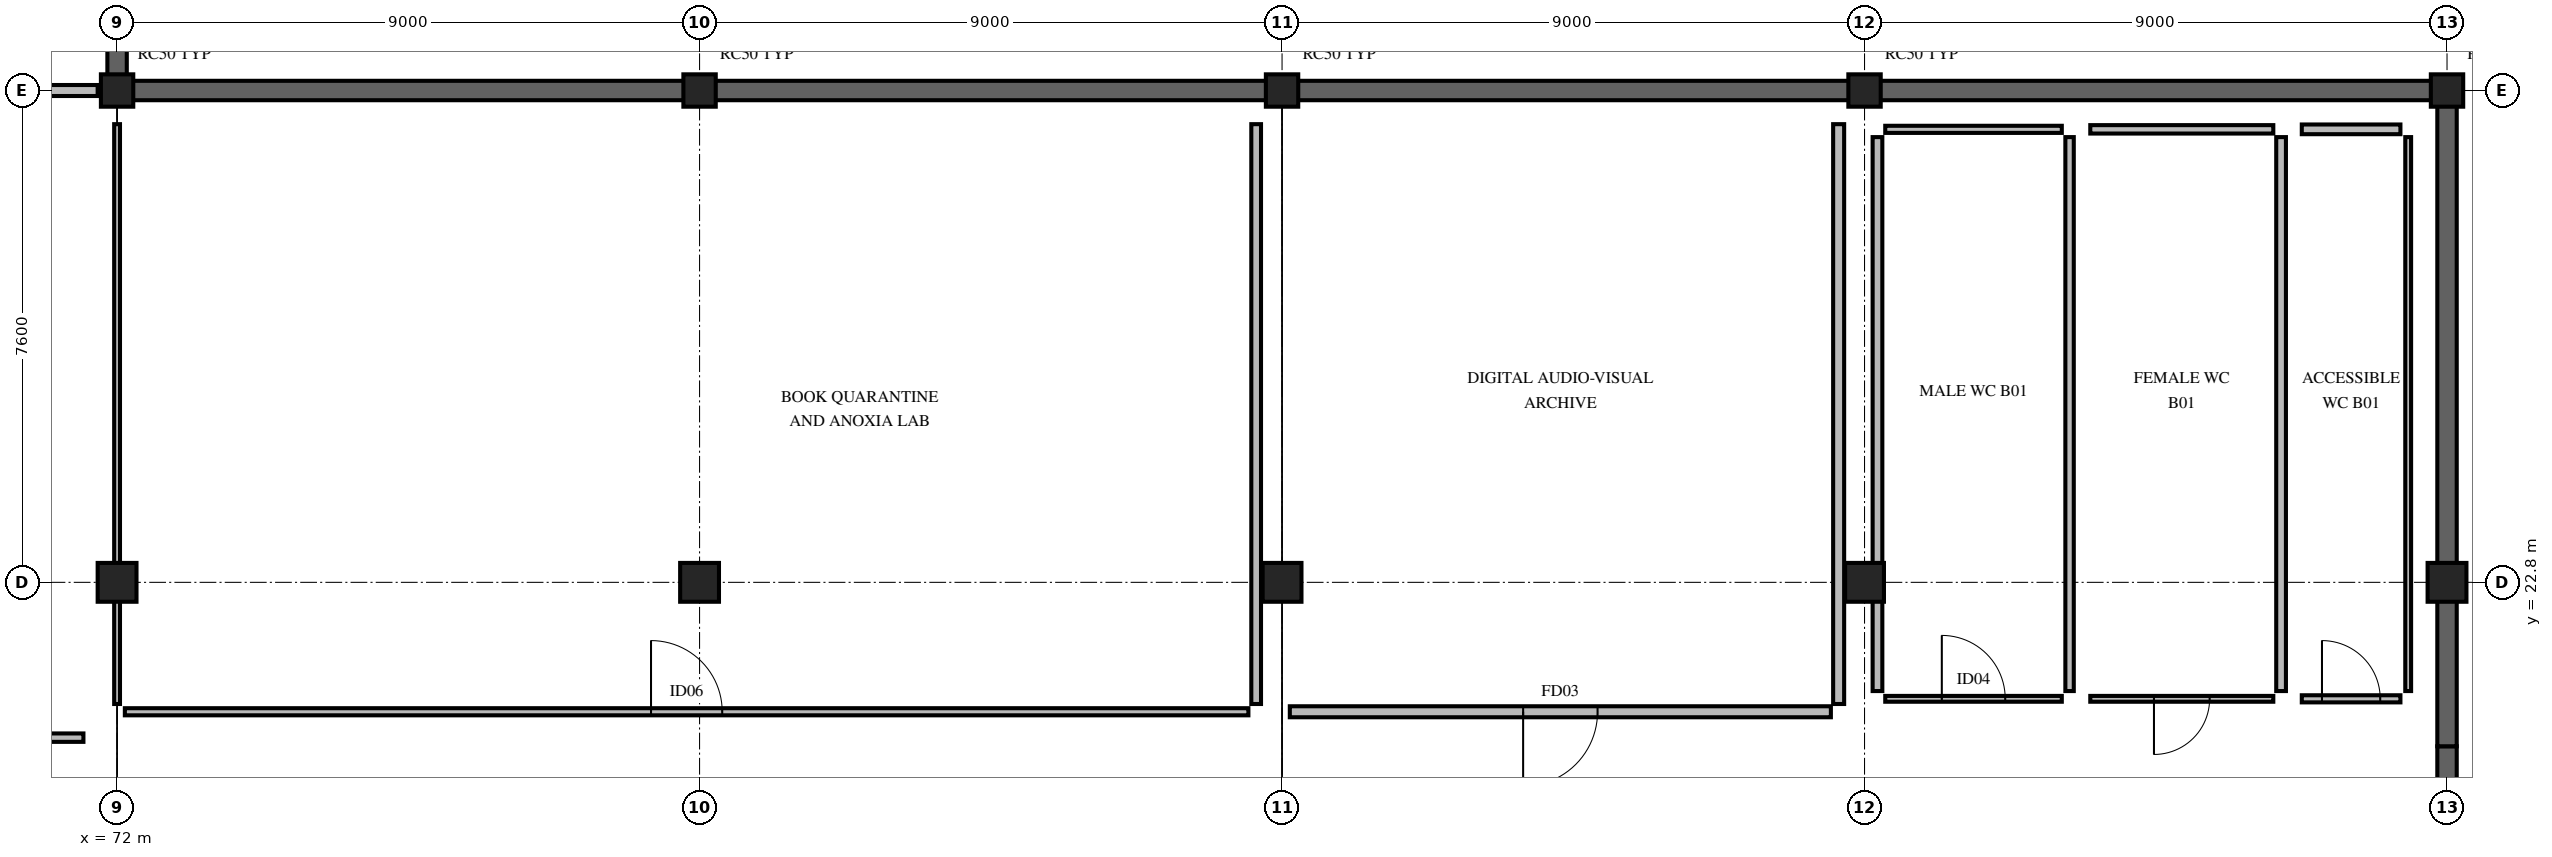
"""IFC4 building model, lengths in metres.
Left out: names, types, materials, properties, quantities, classifications, styles, units other than length and angle.
Written with IfcOpenShell. Run it as: python <this file> out.ifc"""

import sys

from ifc_helpers import new_model, si_unit, direction, frame, frame_2d, origin, origin_2d, place, context, subcontext, project, spatial, rectangle, extrude, element, fill, save


model = new_model("IFC4")
c1 = context("Model", 3, precision=1e-05, world=origin(), true_north=direction((0.0, 1.0)))
c2 = subcontext(c1, "Body", "Model", "MODEL_VIEW")
j1 = project(units=[si_unit("LENGTHUNIT", "METRE"), si_unit("PLANEANGLEUNIT", "RADIAN")], contexts=[c1])
p1 = place(None, origin())
s1 = spatial("IfcSite", under=j1, at=p1, CompositionType="ELEMENT")
p2 = place(p1, origin())
s2 = spatial("IfcBuilding", under=s1, at=p2, CompositionType="ELEMENT")
p3 = place(p2, frame((0.0, 0.0, -4.32)))
s3 = spatial("IfcBuildingStorey", under=s2, at=p3, CompositionType="ELEMENT", Elevation=-4.32)
p4 = place(p3, frame((72.0, 22.8, 0.0), z_axis=(0.0, 0.0, 1.0), x_axis=(1.0, 0.0, 0.0)))
e1 = element("IfcColumn", 1, at=p4, inside=s3, PredefinedType="COLUMN", context=c2, shape_type="SweptSolid", body=[
    extrude(rectangle(XDim=0.6, YDim=0.6, at=origin_2d()), origin(), (0.0, 0.0, 1.0), 4.32),
])
p5 = place(p3, frame((72.0, 30.4, 0.0), z_axis=(0.0, 0.0, 1.0), x_axis=(1.0, 0.0, 0.0)))
e2 = element("IfcColumn", 2, at=p5, inside=s3, PredefinedType="COLUMN", context=c2, shape_type="SweptSolid", body=[
    extrude(rectangle(XDim=0.5, YDim=0.5, at=origin_2d()), origin(), (0.0, 0.0, 1.0), 4.32),
])
p6 = place(p3, frame((81.0, 22.8, 0.0), z_axis=(0.0, 0.0, 1.0), x_axis=(1.0, 0.0, 0.0)))
e3 = element("IfcColumn", 3, at=p6, inside=s3, PredefinedType="COLUMN", context=c2, shape_type="SweptSolid", body=[
    extrude(rectangle(XDim=0.6, YDim=0.6, at=origin_2d()), origin(), (0.0, 0.0, 1.0), 4.32),
])
p7 = place(p3, frame((81.0, 30.4, 0.0), z_axis=(0.0, 0.0, 1.0), x_axis=(1.0, 0.0, 0.0)))
e4 = element("IfcColumn", 4, at=p7, inside=s3, PredefinedType="COLUMN", context=c2, shape_type="SweptSolid", body=[
    extrude(rectangle(XDim=0.5, YDim=0.5, at=origin_2d()), origin(), (0.0, 0.0, 1.0), 4.32),
])
p8 = place(p3, frame((90.0, 22.8, 0.0), z_axis=(0.0, 0.0, 1.0), x_axis=(1.0, 0.0, 0.0)))
e5 = element("IfcColumn", 5, at=p8, inside=s3, PredefinedType="COLUMN", context=c2, shape_type="SweptSolid", body=[
    extrude(rectangle(XDim=0.6, YDim=0.6, at=origin_2d()), origin(), (0.0, 0.0, 1.0), 4.32),
])
p9 = place(p3, frame((90.0, 30.4, 0.0), z_axis=(0.0, 0.0, 1.0), x_axis=(1.0, 0.0, 0.0)))
e6 = element("IfcColumn", 6, at=p9, inside=s3, PredefinedType="COLUMN", context=c2, shape_type="SweptSolid", body=[
    extrude(rectangle(XDim=0.5, YDim=0.5, at=origin_2d()), origin(), (0.0, 0.0, 1.0), 4.32),
])
p10 = place(p3, frame((99.0, 22.8, 0.0), z_axis=(0.0, 0.0, 1.0), x_axis=(1.0, 0.0, 0.0)))
e7 = element("IfcColumn", 7, at=p10, inside=s3, PredefinedType="COLUMN", context=c2, shape_type="SweptSolid", body=[
    extrude(rectangle(XDim=0.6, YDim=0.6, at=origin_2d()), origin(), (0.0, 0.0, 1.0), 4.32),
])
p11 = place(p3, frame((99.0, 30.4, 0.0), z_axis=(0.0, 0.0, 1.0), x_axis=(1.0, 0.0, 0.0)))
e8 = element("IfcColumn", 8, at=p11, inside=s3, PredefinedType="COLUMN", context=c2, shape_type="SweptSolid", body=[
    extrude(rectangle(XDim=0.5, YDim=0.5, at=origin_2d()), origin(), (0.0, 0.0, 1.0), 4.32),
])
p12 = place(p3, frame((108.0, 22.8, 0.0), z_axis=(0.0, 0.0, 1.0), x_axis=(1.0, 0.0, 0.0)))
e9 = element("IfcColumn", 9, at=p12, inside=s3, PredefinedType="COLUMN", context=c2, shape_type="SweptSolid", body=[
    extrude(rectangle(XDim=0.6, YDim=0.6, at=origin_2d()), origin(), (0.0, 0.0, 1.0), 4.32),
])
p13 = place(p3, frame((108.0, 30.4, 0.0), z_axis=(0.0, 0.0, 1.0), x_axis=(1.0, 0.0, 0.0)))
e10 = element("IfcColumn", 10, at=p13, inside=s3, PredefinedType="COLUMN", context=c2, shape_type="SweptSolid", body=[
    extrude(rectangle(XDim=0.5, YDim=0.5, at=origin_2d()), origin(), (0.0, 0.0, 1.0), 4.32),
])
for number, where, z_axis, x_axis in (
    (11, (108.0, 10.133, 0.0), (0.0, 0.0, 1.0), (0.0, 1.0, 0.0)),
    (12, (108.0, 20.267, 0.0), (0.0, 0.0, 1.0), (0.0, 1.0, 0.0)),
):
    element("IfcWall", number, at=place(p3, frame(where, z_axis=z_axis, x_axis=x_axis)), inside=s3, PredefinedType="SOLIDWALL", context=c2, shape_type="SweptSolid", body=[
        extrude(rectangle(XDim=10.133, YDim=0.3, at=frame_2d((5.067, 0.0))), origin(), (0.0, 0.0, 1.0), 4.04),
    ])
for number, where, z_axis, x_axis in (
    (13, (108.0, 30.4, 0.0), (0.0, 0.0, 1.0), (-1.0, 0.0, 0.0)),
    (14, (99.0, 30.4, 0.0), (0.0, 0.0, 1.0), (-1.0, 0.0, 0.0)),
    (15, (90.0, 30.4, 0.0), (0.0, 0.0, 1.0), (-1.0, 0.0, 0.0)),
    (16, (81.0, 30.4, 0.0), (0.0, 0.0, 1.0), (-1.0, 0.0, 0.0)),
):
    element("IfcWall", number, at=place(p3, frame(where, z_axis=z_axis, x_axis=x_axis)), inside=s3, PredefinedType="SOLIDWALL", context=c2, shape_type="SweptSolid", body=[
        extrude(rectangle(XDim=9.0, YDim=0.3, at=frame_2d((4.5, 0.0))), origin(), (0.0, 0.0, 1.0), 4.04),
    ])
p14 = place(p3, frame((72.0, 30.4, 0.0), z_axis=(0.0, 0.0, 1.0), x_axis=(0.0, 1.0, 0.0)))
e17 = element("IfcWall", 17, at=p14, inside=s3, PredefinedType="SOLIDWALL", context=c2, shape_type="SweptSolid", body=[
    extrude(rectangle(XDim=7.6, YDim=0.3, at=frame_2d((3.8, 0.0))), origin(), (0.0, 0.0, 1.0), 4.04),
])
p15 = place(p3, frame((63.3, 30.4, 0.0), z_axis=(0.0, 0.0, 1.0), x_axis=(1.0, 0.0, 0.0)))
e18 = element("IfcWall", 18, at=p15, inside=s3, PredefinedType="PARTITIONING", context=c2, shape_type="SweptSolid", body=[
    extrude(rectangle(XDim=8.4, YDim=0.17, at=frame_2d((4.2, 0.0))), origin(), (0.0, 0.0, 1.0), 3.571),
])
p16 = place(p15, frame((3.5, 0.0, 0.0)))
e19 = element("IfcOpeningElement", 19, at=p16, cuts=e18, PredefinedType="OPENING", context=c2, shape_type="SweptSolid", body=[
    extrude(rectangle(XDim=1.35, YDim=2.18, at=frame_2d((0.675, 1.09))), frame((0.0, 0.095, 0.0), z_axis=(0.0, -1.0, 0.0), x_axis=(1.0, 0.0, 0.0)), (0.0, 0.0, 1.0), 0.19),
])
p17 = place(p15, frame((2.06, 0.0, 0.0)))
e20 = element("IfcOpeningElement", 20, at=p17, cuts=e18, PredefinedType="OPENING", context=c2, shape_type="SweptSolid", body=[
    extrude(rectangle(XDim=1.15, YDim=2.15, at=frame_2d((0.575, 1.075))), frame((0.0, 0.095, 0.0), z_axis=(0.0, -1.0, 0.0), x_axis=(1.0, 0.0, 0.0)), (0.0, 0.0, 1.0), 0.19),
])
p18 = place(p3, frame((72.12, 20.8, 0.0), z_axis=(0.0, 0.0, 1.0), x_axis=(1.0, 0.0, 0.0)))
e21 = element("IfcWall", 21, at=p18, inside=s3, PredefinedType="PARTITIONING", context=c2, shape_type="SweptSolid", body=[
    extrude(rectangle(XDim=17.36, YDim=0.11, at=frame_2d((8.68, 0.0))), origin(), (0.0, 0.0, 1.0), 4.04),
])
p19 = place(p18, frame((8.13, 0.0, 0.0)))
e22 = element("IfcOpeningElement", 22, at=p19, cuts=e21, PredefinedType="OPENING", context=c2, shape_type="SweptSolid", body=[
    extrude(rectangle(XDim=1.1, YDim=2.06, at=frame_2d((0.55, 1.03))), frame((0.0, 0.065, 0.0), z_axis=(0.0, -1.0, 0.0), x_axis=(1.0, 0.0, 0.0)), (0.0, 0.0, 1.0), 0.13),
])
p20 = place(p3, frame((72.0, 20.92, 0.0), z_axis=(0.0, 0.0, 1.0), x_axis=(0.0, 1.0, 0.0)))
e23 = element("IfcWall", 23, at=p20, inside=s3, PredefinedType="PARTITIONING", context=c2, shape_type="SweptSolid", body=[
    extrude(rectangle(XDim=8.96, YDim=0.09, at=frame_2d((4.48, 0.0))), origin(), (0.0, 0.0, 1.0), 3.559),
])
p21 = place(p3, frame((89.6, 20.92, 0.0), z_axis=(0.0, 0.0, 1.0), x_axis=(0.0, 1.0, 0.0)))
e24 = element("IfcWall", 24, at=p21, inside=s3, PredefinedType="PARTITIONING", context=c2, shape_type="SweptSolid", body=[
    extrude(rectangle(XDim=8.96, YDim=0.15, at=frame_2d((4.48, 0.0))), origin(), (0.0, 0.0, 1.0), 4.04),
])
p22 = place(p3, frame((90.12, 20.8, 0.0), z_axis=(0.0, 0.0, 1.0), x_axis=(1.0, 0.0, 0.0)))
e25 = element("IfcWall", 25, at=p22, inside=s3, PredefinedType="PARTITIONING", context=c2, shape_type="SweptSolid", body=[
    extrude(rectangle(XDim=8.36, YDim=0.17, at=frame_2d((4.18, 0.0))), origin(), (0.0, 0.0, 1.0), 4.04),
])
p23 = place(p22, frame((3.605, 0.0, 0.0)))
e26 = element("IfcOpeningElement", 26, at=p23, cuts=e25, PredefinedType="OPENING", context=c2, shape_type="SweptSolid", body=[
    extrude(rectangle(XDim=1.15, YDim=2.15, at=frame_2d((0.575, 1.075))), frame((0.0, 0.095, 0.0), z_axis=(0.0, -1.0, 0.0), x_axis=(1.0, 0.0, 0.0)), (0.0, 0.0, 1.0), 0.19),
])
p24 = place(p3, frame((98.6, 20.92, 0.0), z_axis=(0.0, 0.0, 1.0), x_axis=(0.0, 1.0, 0.0)))
e27 = element("IfcWall", 27, at=p24, inside=s3, PredefinedType="PARTITIONING", context=c2, shape_type="SweptSolid", body=[
    extrude(rectangle(XDim=8.96, YDim=0.17, at=frame_2d((4.48, 0.0))), origin(), (0.0, 0.0, 1.0), 4.04),
])
p25 = place(p3, frame((99.32, 21.0, 0.0), z_axis=(0.0, 0.0, 1.0), x_axis=(1.0, 0.0, 0.0)))
e28 = element("IfcWall", 28, at=p25, inside=s3, PredefinedType="PARTITIONING", context=c2, shape_type="SweptSolid", body=[
    extrude(rectangle(XDim=2.728, YDim=0.09, at=frame_2d((1.364, 0.0))), origin(), (0.0, 0.0, 1.0), 4.04),
])
p26 = place(p25, frame((0.874, 0.0, 0.0)))
e29 = element("IfcOpeningElement", 29, at=p26, cuts=e28, PredefinedType="OPENING", context=c2, shape_type="SweptSolid", body=[
    extrude(rectangle(XDim=0.98, YDim=2.06, at=frame_2d((0.49, 1.03))), frame((0.0, 0.055, 0.0), z_axis=(0.0, -1.0, 0.0), x_axis=(1.0, 0.0, 0.0)), (0.0, 0.0, 1.0), 0.11),
])
p27 = place(p3, frame((99.2, 21.12, 0.0), z_axis=(0.0, 0.0, 1.0), x_axis=(0.0, 1.0, 0.0)))
e30 = element("IfcWall", 30, at=p27, inside=s3, PredefinedType="PARTITIONING", context=c2, shape_type="SweptSolid", body=[
    extrude(rectangle(XDim=8.56, YDim=0.15, at=frame_2d((4.28, 0.0))), origin(), (0.0, 0.0, 1.0), 3.559),
])
p28 = place(p3, frame((102.168, 21.12, 0.0), z_axis=(0.0, 0.0, 1.0), x_axis=(0.0, 1.0, 0.0)))
e31 = element("IfcWall", 31, at=p28, inside=s3, PredefinedType="PARTITIONING", context=c2, shape_type="SweptSolid", body=[
    extrude(rectangle(XDim=8.56, YDim=0.13, at=frame_2d((4.28, 0.0))), origin(), (0.0, 0.0, 1.0), 4.04),
])
p29 = place(p3, frame((99.32, 29.8, 0.0), z_axis=(0.0, 0.0, 1.0), x_axis=(1.0, 0.0, 0.0)))
e32 = element("IfcWall", 32, at=p29, inside=s3, PredefinedType="PARTITIONING", context=c2, shape_type="SweptSolid", body=[
    extrude(rectangle(XDim=2.728, YDim=0.11, at=frame_2d((1.364, 0.0))), origin(), (0.0, 0.0, 1.0), 4.04),
])
p30 = place(p3, frame((102.488, 21.0, 0.0), z_axis=(0.0, 0.0, 1.0), x_axis=(1.0, 0.0, 0.0)))
e33 = element("IfcWall", 33, at=p30, inside=s3, PredefinedType="PARTITIONING", context=c2, shape_type="SweptSolid", body=[
    extrude(rectangle(XDim=2.828, YDim=0.09, at=frame_2d((1.414, 0.0))), origin(), (0.0, 0.0, 1.0), 4.04),
])
p31 = place(p30, frame((0.984, 0.0, 0.0)))
e34 = element("IfcOpeningElement", 34, at=p31, cuts=e33, PredefinedType="OPENING", context=c2, shape_type="SweptSolid", body=[
    extrude(rectangle(XDim=0.86, YDim=2.06, at=frame_2d((0.43, 1.03))), frame((0.0, 0.055, 0.0), z_axis=(0.0, -1.0, 0.0), x_axis=(1.0, 0.0, 0.0)), (0.0, 0.0, 1.0), 0.11),
])
p32 = place(p3, frame((105.436, 21.12, 0.0), z_axis=(0.0, 0.0, 1.0), x_axis=(0.0, 1.0, 0.0)))
e35 = element("IfcWall", 35, at=p32, inside=s3, PredefinedType="PARTITIONING", context=c2, shape_type="SweptSolid", body=[
    extrude(rectangle(XDim=8.56, YDim=0.15, at=frame_2d((4.28, 0.0))), origin(), (0.0, 0.0, 1.0), 4.04),
])
p33 = place(p3, frame((102.488, 29.8, 0.0), z_axis=(0.0, 0.0, 1.0), x_axis=(1.0, 0.0, 0.0)))
e36 = element("IfcWall", 36, at=p33, inside=s3, PredefinedType="PARTITIONING", context=c2, shape_type="SweptSolid", body=[
    extrude(rectangle(XDim=2.828, YDim=0.13, at=frame_2d((1.414, 0.0))), origin(), (0.0, 0.0, 1.0), 4.04),
])
p34 = place(p3, frame((105.756, 21.0, 0.0), z_axis=(0.0, 0.0, 1.0), x_axis=(1.0, 0.0, 0.0)))
e37 = element("IfcWall", 37, at=p34, inside=s3, PredefinedType="PARTITIONING", context=c2, shape_type="SweptSolid", body=[
    extrude(rectangle(XDim=1.524, YDim=0.11, at=frame_2d((0.762, 0.0))), origin(), (0.0, 0.0, 1.0), 4.04),
])
p35 = place(p34, frame((0.312, 0.0, 0.0)))
e38 = element("IfcOpeningElement", 38, at=p35, cuts=e37, PredefinedType="OPENING", context=c2, shape_type="SweptSolid", body=[
    extrude(rectangle(XDim=0.9, YDim=2.06, at=frame_2d((0.45, 1.03))), frame((0.0, 0.065, 0.0), z_axis=(0.0, -1.0, 0.0), x_axis=(1.0, 0.0, 0.0)), (0.0, 0.0, 1.0), 0.13),
])
p36 = place(p3, frame((107.4, 21.12, 0.0), z_axis=(0.0, 0.0, 1.0), x_axis=(0.0, 1.0, 0.0)))
e39 = element("IfcWall", 39, at=p36, inside=s3, PredefinedType="PARTITIONING", context=c2, shape_type="SweptSolid", body=[
    extrude(rectangle(XDim=8.56, YDim=0.09, at=frame_2d((4.28, 0.0))), origin(), (0.0, 0.0, 1.0), 4.04),
])
p37 = place(p3, frame((105.756, 29.8, 0.0), z_axis=(0.0, 0.0, 1.0), x_axis=(1.0, 0.0, 0.0)))
e40 = element("IfcWall", 40, at=p37, inside=s3, PredefinedType="PARTITIONING", context=c2, shape_type="SweptSolid", body=[
    extrude(rectangle(XDim=1.524, YDim=0.15, at=frame_2d((0.762, 0.0))), origin(), (0.0, 0.0, 1.0), 4.04),
])
p38 = place(p3, frame((63.52, 20.4, 0.0), z_axis=(0.0, 0.0, 1.0), x_axis=(1.0, 0.0, 0.0)))
e41 = element("IfcWall", 41, at=p38, inside=s3, PredefinedType="PARTITIONING", context=c2, shape_type="SweptSolid", body=[
    extrude(rectangle(XDim=7.96, YDim=0.13, at=frame_2d((3.98, 0.0))), origin(), (0.0, 0.0, 1.0), 3.711),
])
p39 = place(p38, frame((3.47, 0.0, 0.0)))
e42 = element("IfcOpeningElement", 42, at=p39, cuts=e41, PredefinedType="OPENING", context=c2, shape_type="SweptSolid", body=[
    extrude(rectangle(XDim=1.02, YDim=2.1, at=frame_2d((0.51, 1.05))), frame((0.0, 0.075, 0.0), z_axis=(0.0, -1.0, 0.0), x_axis=(1.0, 0.0, 0.0)), (0.0, 0.0, 1.0), 0.15),
])
p40 = place(p19, origin())
e43 = element("IfcDoor", 43, at=p40, inside=s3, OperationType="SINGLE_SWING_LEFT", PredefinedType="DOOR", context=c2, shape_type="SweptSolid", body=[
    extrude(rectangle(XDim=1.1, YDim=2.06, at=frame_2d((0.55, 1.03))), frame((0.0, 0.025, 0.0), z_axis=(0.0, -1.0, 0.0), x_axis=(1.0, 0.0, 0.0)), (0.0, 0.0, 1.0), 0.05),
])
fill(e22, e43)
p41 = place(p23, origin())
e44 = element("IfcDoor", 44, at=p41, inside=s3, OperationType="SINGLE_SWING_RIGHT", PredefinedType="DOOR", context=c2, shape_type="SweptSolid", body=[
    extrude(rectangle(XDim=1.15, YDim=2.15, at=frame_2d((0.575, 1.075))), frame((0.0, 0.025, 0.0), z_axis=(0.0, -1.0, 0.0), x_axis=(1.0, 0.0, 0.0)), (0.0, 0.0, 1.0), 0.05),
])
fill(e26, e44)
p42 = place(p26, origin())
e45 = element("IfcDoor", 45, at=p42, inside=s3, OperationType="SINGLE_SWING_LEFT", PredefinedType="DOOR", context=c2, shape_type="SweptSolid", body=[
    extrude(rectangle(XDim=0.98, YDim=2.06, at=frame_2d((0.49, 1.03))), frame((0.0, 0.025, 0.0), z_axis=(0.0, -1.0, 0.0), x_axis=(1.0, 0.0, 0.0)), (0.0, 0.0, 1.0), 0.05),
])
fill(e29, e45)
p43 = place(p31, origin())
e46 = element("IfcDoor", 46, at=p43, inside=s3, OperationType="SINGLE_SWING_RIGHT", PredefinedType="DOOR", context=c2, shape_type="SweptSolid", body=[
    extrude(rectangle(XDim=0.86, YDim=2.06, at=frame_2d((0.43, 1.03))), frame((0.0, 0.025, 0.0), z_axis=(0.0, -1.0, 0.0), x_axis=(1.0, 0.0, 0.0)), (0.0, 0.0, 1.0), 0.05),
])
fill(e34, e46)
p44 = place(p35, origin())
e47 = element("IfcDoor", 47, at=p44, inside=s3, OperationType="SINGLE_SWING_LEFT", PredefinedType="DOOR", context=c2, shape_type="SweptSolid", body=[
    extrude(rectangle(XDim=0.9, YDim=2.06, at=frame_2d((0.45, 1.03))), frame((0.0, 0.025, 0.0), z_axis=(0.0, -1.0, 0.0), x_axis=(1.0, 0.0, 0.0)), (0.0, 0.0, 1.0), 0.05),
])
fill(e38, e47)
save(model, sys.argv[1])
